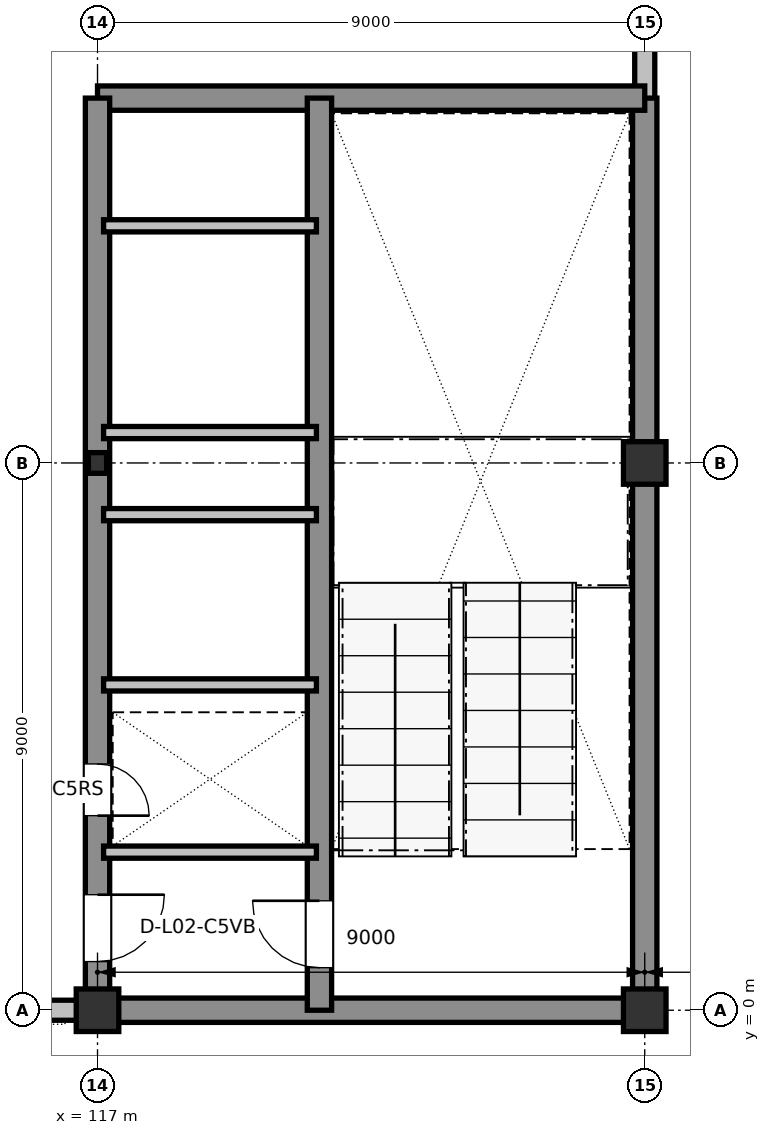
"""IFC4 building model, lengths in metres.
Left out: names, types, materials, properties, quantities, classifications, styles, units other than length and angle.
Written with IfcOpenShell. Run it as: python <this file> out.ifc"""

import sys

from ifc_helpers import new_model, si_unit, direction, frame, frame_2d, origin, origin_2d, place, context, subcontext, project, spatial, rectangle, i_section, extrude, element, fill, save


model = new_model("IFC4")
c1 = context("Model", 3, precision=1e-05, world=origin(), true_north=direction((0.0, 1.0)))
c2 = subcontext(c1, "Body", "Model", "MODEL_VIEW")
j1 = project(units=[si_unit("LENGTHUNIT", "METRE"), si_unit("PLANEANGLEUNIT", "RADIAN")], contexts=[c1])
p1 = place(None, origin())
s1 = spatial("IfcSite", under=j1, at=p1, CompositionType="ELEMENT")
p2 = place(p1, origin())
s2 = spatial("IfcBuilding", under=s1, at=p2, CompositionType="ELEMENT")
p3 = place(p2, frame((0.0, 0.0, 10.2)))
s3 = spatial("IfcBuildingStorey", under=s2, at=p3, CompositionType="ELEMENT", Elevation=10.2)
p4 = place(p3, frame((117.0, 0.0, 0.0), z_axis=(0.0, 0.0, 1.0), x_axis=(1.0, 0.0, 0.0)))
e1 = element("IfcColumn", 1, at=p4, inside=s3, PredefinedType="COLUMN", context=c2, shape_type="SweptSolid", body=[
    extrude(rectangle(XDim=0.7, YDim=0.7, at=origin_2d()), origin(), (0.0, 0.0, 1.0), 4.8),
])
p5 = place(p3, frame((117.0, 9.0, 0.0), z_axis=(0.0, 0.0, 1.0), x_axis=(1.0, 0.0, 0.0)))
e2 = element("IfcColumn", 2, at=p5, inside=s3, PredefinedType="COLUMN", context=c2, shape_type="SweptSolid", body=[
    extrude(i_section(OverallWidth=0.3, OverallDepth=0.34, WebThickness=0.012, FlangeThickness=0.021, at=origin_2d()), origin(), (0.0, 0.0, 1.0), 4.8),
])
for number, where, z_axis, x_axis in (
    (3, (126.0, 0.0, 0.0), (0.0, 0.0, 1.0), (1.0, 0.0, 0.0)),
    (4, (126.0, 9.0, 0.0), (0.0, 0.0, 1.0), (1.0, 0.0, 0.0)),
):
    element("IfcColumn", number, at=place(p3, frame(where, z_axis=z_axis, x_axis=x_axis)), inside=s3, PredefinedType="COLUMN", context=c2, shape_type="SweptSolid", body=[
        extrude(rectangle(XDim=0.7, YDim=0.7, at=origin_2d()), origin(), (0.0, 0.0, 1.0), 4.8),
    ])
p6 = place(p3, frame((126.0, 14.925, 0.0), z_axis=(0.0, 0.0, 1.0), x_axis=(0.0, 1.0, 0.0)))
e5 = element("IfcWall", 5, at=p6, inside=s3, PredefinedType="STANDARD", context=c2, shape_type="SweptSolid", body=[
    extrude(rectangle(XDim=2.74, YDim=0.33, at=frame_2d((1.37, 0.0))), origin(), (0.0, 0.0, 1.0), 4.215),
])
p7 = place(p3, frame((108.335, 0.0, 0.0), z_axis=(0.0, 0.0, 1.0), x_axis=(1.0, 0.0, 0.0)))
e6 = element("IfcWall", 6, at=p7, inside=s3, PredefinedType="STANDARD", context=c2, shape_type="SweptSolid", body=[
    extrude(rectangle(XDim=8.33, YDim=0.33, at=frame_2d((4.165, 0.0))), origin(), (0.0, 0.0, 1.0), 4.235),
])
p8 = place(p7, frame((3.49, 0.0, 0.9)))
e7 = element("IfcOpeningElement", 7, at=p8, cuts=e6, PredefinedType="OPENING", context=c2, shape_type="SweptSolid", body=[
    extrude(rectangle(XDim=1.35, YDim=2.1, at=frame_2d((0.675, 1.05))), frame((0.0, 0.175, 0.0), z_axis=(0.0, -1.0, 0.0), x_axis=(1.0, 0.0, 0.0)), (0.0, 0.0, 1.0), 0.35),
])
p9 = place(p3, frame((117.0, 0.0, 0.0), z_axis=(0.0, 0.0, 1.0), x_axis=(1.0, 0.0, 0.0)))
e8 = element("IfcWall", 8, at=p9, inside=s3, PredefinedType="SHEAR", context=c2, shape_type="SweptSolid", body=[
    extrude(rectangle(XDim=9.0, YDim=0.4, at=frame_2d((4.5, 0.0))), origin(), (0.0, 0.0, 1.0), 4.56),
])
p10 = place(p3, frame((126.0, 0.0, 0.0), z_axis=(0.0, 0.0, 1.0), x_axis=(0.0, 1.0, 0.0)))
e9 = element("IfcWall", 9, at=p10, inside=s3, PredefinedType="SHEAR", context=c2, shape_type="SweptSolid", body=[
    extrude(rectangle(XDim=15.0, YDim=0.4, at=frame_2d((7.5, 0.0))), origin(), (0.0, 0.0, 1.0), 4.56),
])
p11 = place(p3, frame((126.0, 15.0, 0.0), z_axis=(0.0, 0.0, 1.0), x_axis=(-1.0, 0.0, 0.0)))
e10 = element("IfcWall", 10, at=p11, inside=s3, PredefinedType="SHEAR", context=c2, shape_type="SweptSolid", body=[
    extrude(rectangle(XDim=9.0, YDim=0.4, at=frame_2d((4.5, 0.0))), origin(), (0.0, 0.0, 1.0), 4.56),
])
p12 = place(p3, frame((117.0, 15.0, 0.0), z_axis=(0.0, 0.0, 1.0), x_axis=(0.0, -1.0, 0.0)))
e11 = element("IfcWall", 11, at=p12, inside=s3, PredefinedType="SHEAR", context=c2, shape_type="SweptSolid", body=[
    extrude(rectangle(XDim=15.0, YDim=0.4, at=frame_2d((7.5, 0.0))), origin(), (0.0, 0.0, 1.0), 4.56),
])
p13 = place(p12, frame((13.1, 0.0, 0.0)))
e12 = element("IfcOpeningElement", 12, at=p13, cuts=e11, PredefinedType="OPENING", context=c2, shape_type="SweptSolid", body=[
    extrude(rectangle(XDim=1.1, YDim=2.16, at=frame_2d((0.55, 1.08))), frame((0.0, 0.21, 0.0), z_axis=(0.0, -1.0, 0.0), x_axis=(1.0, 0.0, 0.0)), (0.0, 0.0, 1.0), 0.42),
])
p14 = place(p12, frame((10.95, 0.0, 0.0)))
e13 = element("IfcOpeningElement", 13, at=p14, cuts=e11, PredefinedType="OPENING", context=c2, shape_type="SweptSolid", body=[
    extrude(rectangle(XDim=0.85, YDim=2.1, at=frame_2d((0.425, 1.05))), frame((0.0, 0.21, 0.0), z_axis=(0.0, -1.0, 0.0), x_axis=(1.0, 0.0, 0.0)), (0.0, 0.0, 1.0), 0.42),
])
p15 = place(p3, frame((120.65, 0.0, 0.0), z_axis=(0.0, 0.0, 1.0), x_axis=(0.0, 1.0, 0.0)))
e14 = element("IfcWall", 14, at=p15, inside=s3, PredefinedType="SHEAR", context=c2, shape_type="SweptSolid", body=[
    extrude(rectangle(XDim=15.0, YDim=0.4, at=frame_2d((7.5, 0.0))), origin(), (0.0, 0.0, 1.0), 4.56),
])
p16 = place(p15, frame((0.7, 0.0, 0.0)))
e15 = element("IfcOpeningElement", 15, at=p16, cuts=e14, PredefinedType="OPENING", context=c2, shape_type="SweptSolid", body=[
    extrude(rectangle(XDim=1.1, YDim=2.16, at=frame_2d((0.55, 1.08))), frame((0.0, 0.21, 0.0), z_axis=(0.0, -1.0, 0.0), x_axis=(1.0, 0.0, 0.0)), (0.0, 0.0, 1.0), 0.42),
])
for number, where, z_axis, x_axis in (
    (16, (117.1, 2.6, 0.0), (0.0, 0.0, 1.0), (1.0, 0.0, 0.0)),
    (17, (117.1, 5.35, 0.0), (0.0, 0.0, 1.0), (1.0, 0.0, 0.0)),
    (18, (117.1, 8.15, 0.0), (0.0, 0.0, 1.0), (1.0, 0.0, 0.0)),
    (19, (117.1, 9.5, 0.0), (0.0, 0.0, 1.0), (1.0, 0.0, 0.0)),
    (20, (117.1, 12.9, 0.0), (0.0, 0.0, 1.0), (1.0, 0.0, 0.0)),
):
    element("IfcWall", number, at=place(p3, frame(where, z_axis=z_axis, x_axis=x_axis)), inside=s3, PredefinedType="PARTITIONING", context=c2, shape_type="SweptSolid", body=[
        extrude(rectangle(XDim=3.5, YDim=0.2, at=frame_2d((1.75, 0.0))), origin(), (0.0, 0.0, 1.0), 4.56),
    ])
p17 = place(p16, origin())
e21 = element("IfcDoor", 21, at=p17, inside=s3, OperationType="SINGLE_SWING_RIGHT", PredefinedType="DOOR", context=c2, shape_type="SweptSolid", body=[
    extrude(rectangle(XDim=1.1, YDim=2.16, at=frame_2d((0.55, 1.08))), frame((0.0, 0.025, 0.0), z_axis=(0.0, -1.0, 0.0), x_axis=(1.0, 0.0, 0.0)), (0.0, 0.0, 1.0), 0.05),
])
fill(e15, e21)
p18 = place(p13, origin())
e22 = element("IfcDoor", 22, at=p18, inside=s3, OperationType="SINGLE_SWING_LEFT", PredefinedType="DOOR", context=c2, shape_type="SweptSolid", body=[
    extrude(rectangle(XDim=1.1, YDim=2.16, at=frame_2d((0.55, 1.08))), frame((0.0, 0.025, 0.0), z_axis=(0.0, -1.0, 0.0), x_axis=(1.0, 0.0, 0.0)), (0.0, 0.0, 1.0), 0.05),
])
fill(e12, e22)
p19 = place(p14, origin())
e23 = element("IfcDoor", 23, at=p19, inside=s3, OperationType="SINGLE_SWING_RIGHT", PredefinedType="DOOR", context=c2, shape_type="SweptSolid", body=[
    extrude(rectangle(XDim=0.85, YDim=2.1, at=frame_2d((0.425, 1.05))), frame((0.0, 0.025, 0.0), z_axis=(0.0, -1.0, 0.0), x_axis=(1.0, 0.0, 0.0)), (0.0, 0.0, 1.0), 0.05),
])
fill(e13, e23)
save(model, sys.argv[1])
